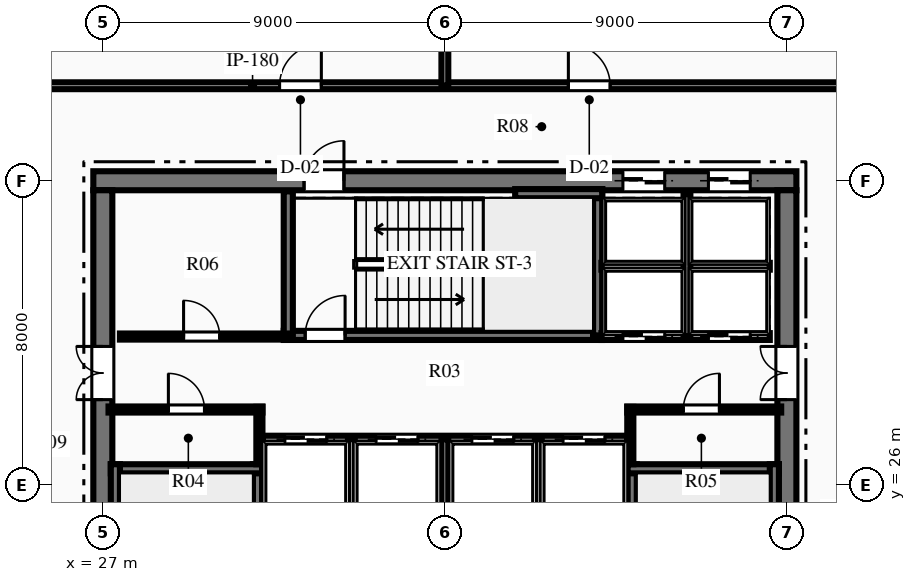
"""IFC4 building model, lengths in metres.
Left out: names, types, materials, properties, quantities, classifications, styles, units other than length and angle.
Written with IfcOpenShell. Run it as: python <this file> out.ifc"""

import sys

from ifc_helpers import new_model, si_unit, direction, frame, frame_2d, origin, place, context, subcontext, project, spatial, rectangle, extrude, element, fill, save


model = new_model("IFC4")
c1 = context("Model", 3, precision=1e-05, world=origin(), true_north=direction((0.0, 1.0)))
c2 = subcontext(c1, "Body", "Model", "MODEL_VIEW")
j1 = project(units=[si_unit("LENGTHUNIT", "METRE"), si_unit("PLANEANGLEUNIT", "RADIAN")], contexts=[c1])
p1 = place(None, origin())
s1 = spatial("IfcSite", under=j1, at=p1, CompositionType="ELEMENT")
p2 = place(p1, origin())
s2 = spatial("IfcBuilding", under=s1, at=p2, CompositionType="ELEMENT")
p3 = place(p2, frame((0.0, 0.0, 189.45)))
s3 = spatial("IfcBuildingStorey", under=s2, at=p3, CompositionType="ELEMENT", Elevation=189.45)
p4 = place(p3, frame((26.75, 34.0, 0.0), z_axis=(0.0, 0.0, 1.0), x_axis=(1.0, 0.0, 0.0)))
e1 = element("IfcWall", 1, at=p4, inside=s3, PredefinedType="SHEAR", context=c2, shape_type="SweptSolid", body=[
    extrude(rectangle(XDim=18.5, YDim=0.5, at=frame_2d((9.25, 0.0))), origin(), (0.0, 0.0, 1.0), 4.5),
])
p5 = place(p4, frame((5.545, 0.0, 0.0)))
e2 = element("IfcOpeningElement", 2, at=p5, cuts=e1, PredefinedType="OPENING", context=c2, shape_type="SweptSolid", body=[
    extrude(rectangle(XDim=1.05, YDim=2.15, at=frame_2d((0.525, 1.075))), frame((0.0, 0.26, 0.0), z_axis=(0.0, -1.0, 0.0), x_axis=(1.0, 0.0, 0.0)), (0.0, 0.0, 1.0), 0.52),
])
p6 = place(p4, frame((13.935, 0.0, 0.0)))
e3 = element("IfcOpeningElement", 3, at=p6, cuts=e1, PredefinedType="OPENING", context=c2, shape_type="SweptSolid", body=[
    extrude(rectangle(XDim=1.1, YDim=2.15, at=frame_2d((0.55, 1.075))), frame((0.0, 0.26, 0.0), z_axis=(0.0, -1.0, 0.0), x_axis=(1.0, 0.0, 0.0)), (0.0, 0.0, 1.0), 0.52),
])
p7 = place(p4, frame((16.185, 0.0, 0.0)))
e4 = element("IfcOpeningElement", 4, at=p7, cuts=e1, PredefinedType="OPENING", context=c2, shape_type="SweptSolid", body=[
    extrude(rectangle(XDim=1.1, YDim=2.15, at=frame_2d((0.55, 1.075))), frame((0.0, 0.26, 0.0), z_axis=(0.0, -1.0, 0.0), x_axis=(1.0, 0.0, 0.0)), (0.0, 0.0, 1.0), 0.52),
])
p8 = place(p3, frame((27.0, 18.25, 0.0), z_axis=(0.0, 0.0, 1.0), x_axis=(0.0, 1.0, 0.0)))
e5 = element("IfcWall", 5, at=p8, inside=s3, PredefinedType="SHEAR", context=c2, shape_type="SweptSolid", body=[
    extrude(rectangle(XDim=15.5, YDim=0.5, at=frame_2d((7.75, 0.0))), origin(), (0.0, 0.0, 1.0), 4.5),
])
p9 = place(p8, frame((9.99, 0.0, 0.0)))
e6 = element("IfcOpeningElement", 6, at=p9, cuts=e5, PredefinedType="OPENING", context=c2, shape_type="SweptSolid", body=[
    extrude(rectangle(XDim=1.4, YDim=2.2, at=frame_2d((0.7, 1.1))), frame((0.0, 0.26, 0.0), z_axis=(0.0, -1.0, 0.0), x_axis=(1.0, 0.0, 0.0)), (0.0, 0.0, 1.0), 0.52),
])
p10 = place(p3, frame((45.0, 18.25, 0.0), z_axis=(0.0, 0.0, 1.0), x_axis=(0.0, 1.0, 0.0)))
e7 = element("IfcWall", 7, at=p10, inside=s3, PredefinedType="SHEAR", context=c2, shape_type="SweptSolid", body=[
    extrude(rectangle(XDim=15.5, YDim=0.5, at=frame_2d((7.75, 0.0))), origin(), (0.0, 0.0, 1.0), 4.5),
])
p11 = place(p10, frame((9.99, 0.0, 0.0)))
e8 = element("IfcOpeningElement", 8, at=p11, cuts=e7, PredefinedType="OPENING", context=c2, shape_type="SweptSolid", body=[
    extrude(rectangle(XDim=1.4, YDim=2.2, at=frame_2d((0.7, 1.1))), frame((0.0, 0.26, 0.0), z_axis=(0.0, -1.0, 0.0), x_axis=(1.0, 0.0, 0.0)), (0.0, 0.0, 1.0), 0.52),
])
p12 = place(p3, frame((31.07, 18.28, 0.0), z_axis=(0.0, 0.0, 1.0), x_axis=(0.0, 1.0, 0.0)))
e9 = element("IfcWall", 9, at=p12, inside=s3, PredefinedType="SHEAR", context=c2, shape_type="SweptSolid", body=[
    extrude(rectangle(XDim=8.26, YDim=0.24, at=frame_2d((4.13, 0.0))), origin(), (0.0, 0.0, 1.0), 4.5),
])
p13 = place(p12, frame((0.365, 0.0, 0.0)))
e10 = element("IfcOpeningElement", 10, at=p13, cuts=e9, PredefinedType="OPENING", context=c2, shape_type="SweptSolid", body=[
    extrude(rectangle(XDim=1.05, YDim=2.15, at=frame_2d((0.525, 1.075))), frame((0.0, 0.13, 0.0), z_axis=(0.0, -1.0, 0.0), x_axis=(1.0, 0.0, 0.0)), (0.0, 0.0, 1.0), 0.26),
])
p14 = place(p3, frame((27.21, 26.42, 0.0), z_axis=(0.0, 0.0, 1.0), x_axis=(1.0, 0.0, 0.0)))
e11 = element("IfcWall", 11, at=p14, inside=s3, PredefinedType="SHEAR", context=c2, shape_type="SweptSolid", body=[
    extrude(rectangle(XDim=3.98, YDim=0.24, at=frame_2d((1.99, 0.0))), origin(), (0.0, 0.0, 1.0), 4.5),
])
p15 = place(p3, frame((27.33, 18.28, 0.0), z_axis=(0.0, 0.0, 1.0), x_axis=(0.0, 1.0, 0.0)))
e12 = element("IfcWall", 12, at=p15, inside=s3, PredefinedType="SHEAR", context=c2, shape_type="SweptSolid", body=[
    extrude(rectangle(XDim=8.26, YDim=0.24, at=frame_2d((4.13, 0.0))), origin(), (0.0, 0.0, 1.0), 4.5),
])
p16 = place(p3, frame((40.93, 18.28, 0.0), z_axis=(0.0, 0.0, 1.0), x_axis=(0.0, 1.0, 0.0)))
e13 = element("IfcWall", 13, at=p16, inside=s3, PredefinedType="SHEAR", context=c2, shape_type="SweptSolid", body=[
    extrude(rectangle(XDim=8.26, YDim=0.24, at=frame_2d((4.13, 0.0))), origin(), (0.0, 0.0, 1.0), 4.5),
])
p17 = place(p16, frame((0.365, 0.0, 0.0)))
e14 = element("IfcOpeningElement", 14, at=p17, cuts=e13, PredefinedType="OPENING", context=c2, shape_type="SweptSolid", body=[
    extrude(rectangle(XDim=1.05, YDim=2.15, at=frame_2d((0.525, 1.075))), frame((0.0, 0.13, 0.0), z_axis=(0.0, -1.0, 0.0), x_axis=(1.0, 0.0, 0.0)), (0.0, 0.0, 1.0), 0.26),
])
p18 = place(p3, frame((40.81, 26.42, 0.0), z_axis=(0.0, 0.0, 1.0), x_axis=(1.0, 0.0, 0.0)))
e15 = element("IfcWall", 15, at=p18, inside=s3, PredefinedType="SHEAR", context=c2, shape_type="SweptSolid", body=[
    extrude(rectangle(XDim=3.98, YDim=0.24, at=frame_2d((1.99, 0.0))), origin(), (0.0, 0.0, 1.0), 4.5),
])
p19 = place(p3, frame((44.67, 18.28, 0.0), z_axis=(0.0, 0.0, 1.0), x_axis=(0.0, 1.0, 0.0)))
e16 = element("IfcWall", 16, at=p19, inside=s3, PredefinedType="SHEAR", context=c2, shape_type="SweptSolid", body=[
    extrude(rectangle(XDim=8.26, YDim=0.24, at=frame_2d((4.13, 0.0))), origin(), (0.0, 0.0, 1.0), 4.5),
])
p20 = place(p3, frame((31.76, 29.93, 0.0), z_axis=(0.0, 0.0, 1.0), x_axis=(1.0, 0.0, 0.0)))
e17 = element("IfcWall", 17, at=p20, inside=s3, PredefinedType="SHEAR", context=c2, shape_type="SweptSolid", body=[
    extrude(rectangle(XDim=8.38, YDim=0.24, at=frame_2d((4.19, 0.0))), origin(), (0.0, 0.0, 1.0), 4.5),
])
p21 = place(p20, frame((0.565, 0.0, 0.0)))
e18 = element("IfcOpeningElement", 18, at=p21, cuts=e17, PredefinedType="OPENING", context=c2, shape_type="SweptSolid", body=[
    extrude(rectangle(XDim=1.05, YDim=2.15, at=frame_2d((0.525, 1.075))), frame((0.0, 0.13, 0.0), z_axis=(0.0, -1.0, 0.0), x_axis=(1.0, 0.0, 0.0)), (0.0, 0.0, 1.0), 0.26),
])
p22 = place(p3, frame((31.88, 29.93, 0.0), z_axis=(0.0, 0.0, 1.0), x_axis=(0.0, 1.0, 0.0)))
e19 = element("IfcWall", 19, at=p22, inside=s3, PredefinedType="SHEAR", context=c2, shape_type="SweptSolid", body=[
    extrude(rectangle(XDim=3.79, YDim=0.24, at=frame_2d((1.895, 0.0))), origin(), (0.0, 0.0, 1.0), 4.5),
])
p23 = place(p3, frame((40.02, 29.93, 0.0), z_axis=(0.0, 0.0, 1.0), x_axis=(0.0, 1.0, 0.0)))
e20 = element("IfcWall", 20, at=p23, inside=s3, PredefinedType="SHEAR", context=c2, shape_type="SweptSolid", body=[
    extrude(rectangle(XDim=3.85, YDim=0.24, at=frame_2d((1.925, 0.0))), origin(), (0.0, 0.0, 1.0), 4.5),
])
p24 = place(p3, frame((37.85, 33.66, 0.0), z_axis=(0.0, 0.0, 1.0), x_axis=(1.0, 0.0, 0.0)))
e21 = element("IfcWall", 21, at=p24, inside=s3, PredefinedType="SHEAR", context=c2, shape_type="SweptSolid", body=[
    extrude(rectangle(XDim=2.29, YDim=0.24, at=frame_2d((1.145, 0.0))), origin(), (0.0, 0.0, 1.0), 4.5),
])
p25 = place(p3, frame((27.15, 27.98, 0.0), z_axis=(0.0, 0.0, 1.0), x_axis=(1.0, 0.0, 0.0)))
e22 = element("IfcWall", 22, at=p25, inside=s3, PredefinedType="PARTITIONING", context=c2, shape_type="SweptSolid", body=[
    extrude(rectangle(XDim=4.05, YDim=0.16, at=frame_2d((2.025, 0.0))), origin(), (0.0, 0.0, 1.0), 4.09),
])
p26 = place(p25, frame((1.575, 0.0, 0.0)))
e23 = element("IfcOpeningElement", 23, at=p26, cuts=e22, PredefinedType="OPENING", context=c2, shape_type="SweptSolid", body=[
    extrude(rectangle(XDim=0.95, YDim=2.15, at=frame_2d((0.475, 1.075))), frame((0.0, 0.09, 0.0), z_axis=(0.0, -1.0, 0.0), x_axis=(1.0, 0.0, 0.0)), (0.0, 0.0, 1.0), 0.18),
])
p27 = place(p3, frame((31.12, 26.54, 0.0), z_axis=(0.0, 0.0, 1.0), x_axis=(0.0, 1.0, 0.0)))
e24 = element("IfcWall", 24, at=p27, inside=s3, PredefinedType="PARTITIONING", context=c2, shape_type="SweptSolid", body=[
    extrude(rectangle(XDim=1.51, YDim=0.16, at=frame_2d((0.755, 0.0))), origin(), (0.0, 0.0, 1.0), 4.09),
])
p28 = place(p3, frame((40.8, 27.98, 0.0), z_axis=(0.0, 0.0, 1.0), x_axis=(1.0, 0.0, 0.0)))
e25 = element("IfcWall", 25, at=p28, inside=s3, PredefinedType="PARTITIONING", context=c2, shape_type="SweptSolid", body=[
    extrude(rectangle(XDim=4.05, YDim=0.16, at=frame_2d((2.025, 0.0))), origin(), (0.0, 0.0, 1.0), 4.09),
])
p29 = place(p28, frame((1.475, 0.0, 0.0)))
e26 = element("IfcOpeningElement", 26, at=p29, cuts=e25, PredefinedType="OPENING", context=c2, shape_type="SweptSolid", body=[
    extrude(rectangle(XDim=0.95, YDim=2.15, at=frame_2d((0.475, 1.075))), frame((0.0, 0.09, 0.0), z_axis=(0.0, -1.0, 0.0), x_axis=(1.0, 0.0, 0.0)), (0.0, 0.0, 1.0), 0.18),
])
p30 = place(p3, frame((40.88, 26.54, 0.0), z_axis=(0.0, 0.0, 1.0), x_axis=(0.0, 1.0, 0.0)))
e27 = element("IfcWall", 27, at=p30, inside=s3, PredefinedType="PARTITIONING", context=c2, shape_type="SweptSolid", body=[
    extrude(rectangle(XDim=1.51, YDim=0.16, at=frame_2d((0.755, 0.0))), origin(), (0.0, 0.0, 1.0), 4.09),
])
p31 = place(p3, frame((27.45, 29.9, 0.0), z_axis=(0.0, 0.0, 1.0), x_axis=(1.0, 0.0, 0.0)))
e28 = element("IfcWall", 28, at=p31, inside=s3, PredefinedType="PARTITIONING", context=c2, shape_type="SweptSolid", body=[
    extrude(rectangle(XDim=4.43, YDim=0.16, at=frame_2d((2.215, 0.0))), origin(), (0.0, 0.0, 1.0), 4.09),
])
p32 = place(p31, frame((1.675, 0.0, 0.0)))
e29 = element("IfcOpeningElement", 29, at=p32, cuts=e28, PredefinedType="OPENING", context=c2, shape_type="SweptSolid", body=[
    extrude(rectangle(XDim=0.95, YDim=2.15, at=frame_2d((0.475, 1.075))), frame((0.0, 0.09, 0.0), z_axis=(0.0, -1.0, 0.0), x_axis=(1.0, 0.0, 0.0)), (0.0, 0.0, 1.0), 0.18),
])
p33 = place(p3, frame((40.12, 29.9, 0.0), z_axis=(0.0, 0.0, 1.0), x_axis=(1.0, 0.0, 0.0)))
e30 = element("IfcWall", 30, at=p33, inside=s3, PredefinedType="PARTITIONING", context=c2, shape_type="SweptSolid", body=[
    extrude(rectangle(XDim=4.43, YDim=0.18, at=frame_2d((2.215, 0.0))), origin(), (0.0, 0.0, 1.0), 4.09),
])
p34 = place(p33, frame((0.565, 0.0, 0.0)))
e31 = element("IfcOpeningElement", 31, at=p34, cuts=e30, PredefinedType="OPENING", context=c2, shape_type="SweptSolid", body=[
    extrude(rectangle(XDim=1.1, YDim=2.15, at=frame_2d((0.55, 1.075))), frame((0.0, 0.1, 0.0), z_axis=(0.0, -1.0, 0.0), x_axis=(1.0, 0.0, 0.0)), (0.0, 0.0, 1.0), 0.2),
])
p35 = place(p33, frame((2.815, 0.0, 0.0)))
e32 = element("IfcOpeningElement", 32, at=p35, cuts=e30, PredefinedType="OPENING", context=c2, shape_type="SweptSolid", body=[
    extrude(rectangle(XDim=1.1, YDim=2.15, at=frame_2d((0.55, 1.075))), frame((0.0, 0.1, 0.0), z_axis=(0.0, -1.0, 0.0), x_axis=(1.0, 0.0, 0.0)), (0.0, 0.0, 1.0), 0.2),
])
p36 = place(p3, frame((40.12, 31.75, 0.0), z_axis=(0.0, 0.0, 1.0), x_axis=(1.0, 0.0, 0.0)))
e33 = element("IfcWall", 33, at=p36, inside=s3, PredefinedType="PARTITIONING", context=c2, shape_type="SweptSolid", body=[
    extrude(rectangle(XDim=4.43, YDim=0.18, at=frame_2d((2.215, 0.0))), origin(), (0.0, 0.0, 1.0), 4.09),
])
p37 = place(p3, frame((42.37, 29.9, 0.0), z_axis=(0.0, 0.0, 1.0), x_axis=(0.0, 1.0, 0.0)))
e34 = element("IfcWall", 34, at=p37, inside=s3, PredefinedType="PARTITIONING", context=c2, shape_type="SweptSolid", body=[
    extrude(rectangle(XDim=3.75, YDim=0.18, at=frame_2d((1.875, 0.0))), origin(), (0.0, 0.0, 1.0), 4.09),
])
p38 = place(p3, frame((31.2, 27.2, 0.0), z_axis=(0.0, 0.0, 1.0), x_axis=(1.0, 0.0, 0.0)))
e35 = element("IfcWall", 35, at=p38, inside=s3, PredefinedType="PARTITIONING", context=c2, shape_type="SweptSolid", body=[
    extrude(rectangle(XDim=9.6, YDim=0.18, at=frame_2d((4.8, 0.0))), origin(), (0.0, 0.0, 1.0), 4.09),
])
p39 = place(p38, frame((0.59, 0.0, 0.0)))
e36 = element("IfcOpeningElement", 36, at=p39, cuts=e35, PredefinedType="OPENING", context=c2, shape_type="SweptSolid", body=[
    extrude(rectangle(XDim=1.1, YDim=2.15, at=frame_2d((0.55, 1.075))), frame((0.0, 0.1, 0.0), z_axis=(0.0, -1.0, 0.0), x_axis=(1.0, 0.0, 0.0)), (0.0, 0.0, 1.0), 0.2),
])
p40 = place(p38, frame((2.99, 0.0, 0.0)))
e37 = element("IfcOpeningElement", 37, at=p40, cuts=e35, PredefinedType="OPENING", context=c2, shape_type="SweptSolid", body=[
    extrude(rectangle(XDim=1.1, YDim=2.15, at=frame_2d((0.55, 1.075))), frame((0.0, 0.1, 0.0), z_axis=(0.0, -1.0, 0.0), x_axis=(1.0, 0.0, 0.0)), (0.0, 0.0, 1.0), 0.2),
])
p41 = place(p38, frame((5.51, 0.0, 0.0)))
e38 = element("IfcOpeningElement", 38, at=p41, cuts=e35, PredefinedType="OPENING", context=c2, shape_type="SweptSolid", body=[
    extrude(rectangle(XDim=1.1, YDim=2.15, at=frame_2d((0.55, 1.075))), frame((0.0, 0.1, 0.0), z_axis=(0.0, -1.0, 0.0), x_axis=(1.0, 0.0, 0.0)), (0.0, 0.0, 1.0), 0.2),
])
p42 = place(p38, frame((7.91, 0.0, 0.0)))
e39 = element("IfcOpeningElement", 39, at=p42, cuts=e35, PredefinedType="OPENING", context=c2, shape_type="SweptSolid", body=[
    extrude(rectangle(XDim=1.1, YDim=2.15, at=frame_2d((0.55, 1.075))), frame((0.0, 0.1, 0.0), z_axis=(0.0, -1.0, 0.0), x_axis=(1.0, 0.0, 0.0)), (0.0, 0.0, 1.0), 0.2),
])
for number, where, z_axis, x_axis in (
    (40, (33.54, 25.3, 0.0), (0.0, 0.0, 1.0), (0.0, 1.0, 0.0)),
    (41, (36.0, 25.3, 0.0), (0.0, 0.0, 1.0), (0.0, 1.0, 0.0)),
    (42, (38.46, 25.3, 0.0), (0.0, 0.0, 1.0), (0.0, 1.0, 0.0)),
):
    element("IfcWall", number, at=place(p3, frame(where, z_axis=z_axis, x_axis=x_axis)), inside=s3, PredefinedType="PARTITIONING", context=c2, shape_type="SweptSolid", body=[
        extrude(rectangle(XDim=1.9, YDim=0.18, at=frame_2d((0.95, 0.0))), origin(), (0.0, 0.0, 1.0), 4.09),
    ])
p43 = place(p3, frame((24.5, 36.5, 0.0), z_axis=(0.0, 0.0, 1.0), x_axis=(1.0, 0.0, 0.0)))
e43 = element("IfcWall", 43, at=p43, inside=s3, PredefinedType="PARTITIONING", context=c2, shape_type="SweptSolid", body=[
    extrude(rectangle(XDim=23.0, YDim=0.18, at=frame_2d((11.5, 0.0))), origin(), (0.0, 0.0, 1.0), 4.09),
])
p44 = place(p43, frame((7.15, 0.0, 0.0)))
e44 = element("IfcOpeningElement", 44, at=p44, cuts=e43, PredefinedType="OPENING", context=c2, shape_type="SweptSolid", body=[
    extrude(rectangle(XDim=1.1, YDim=2.15, at=frame_2d((0.55, 1.075))), frame((0.0, 0.1, 0.0), z_axis=(0.0, -1.0, 0.0), x_axis=(1.0, 0.0, 0.0)), (0.0, 0.0, 1.0), 0.2),
])
p45 = place(p43, frame((14.75, 0.0, 0.0)))
e45 = element("IfcOpeningElement", 45, at=p45, cuts=e43, PredefinedType="OPENING", context=c2, shape_type="SweptSolid", body=[
    extrude(rectangle(XDim=1.1, YDim=2.15, at=frame_2d((0.55, 1.075))), frame((0.0, 0.1, 0.0), z_axis=(0.0, -1.0, 0.0), x_axis=(1.0, 0.0, 0.0)), (0.0, 0.0, 1.0), 0.2),
])
p46 = place(p3, frame((36.0, 36.5, 0.0), z_axis=(0.0, 0.0, 1.0), x_axis=(0.0, 1.0, 0.0)))
e46 = element("IfcWall", 46, at=p46, inside=s3, PredefinedType="PARTITIONING", context=c2, shape_type="SweptSolid", body=[
    extrude(rectangle(XDim=18.678, YDim=0.18, at=frame_2d((9.339, 0.0))), origin(), (0.0, 0.0, 1.0), 2.885),
])
p47 = place(p26, origin())
e47 = element("IfcDoor", 47, at=p47, inside=s3, OperationType="SINGLE_SWING_LEFT", PredefinedType="DOOR", context=c2, shape_type="SweptSolid", body=[
    extrude(rectangle(XDim=0.95, YDim=2.15, at=frame_2d((0.475, 1.075))), frame((0.0, 0.025, 0.0), z_axis=(0.0, -1.0, 0.0), x_axis=(1.0, 0.0, 0.0)), (0.0, 0.0, 1.0), 0.05),
])
fill(e23, e47)
p48 = place(p29, origin())
e48 = element("IfcDoor", 48, at=p48, inside=s3, OperationType="SINGLE_SWING_RIGHT", PredefinedType="DOOR", context=c2, shape_type="SweptSolid", body=[
    extrude(rectangle(XDim=0.95, YDim=2.15, at=frame_2d((0.475, 1.075))), frame((0.0, 0.025, 0.0), z_axis=(0.0, -1.0, 0.0), x_axis=(1.0, 0.0, 0.0)), (0.0, 0.0, 1.0), 0.05),
])
fill(e26, e48)
p49 = place(p32, origin())
e49 = element("IfcDoor", 49, at=p49, inside=s3, OperationType="SINGLE_SWING_LEFT", PredefinedType="DOOR", context=c2, shape_type="SweptSolid", body=[
    extrude(rectangle(XDim=0.95, YDim=2.15, at=frame_2d((0.475, 1.075))), frame((0.0, 0.025, 0.0), z_axis=(0.0, -1.0, 0.0), x_axis=(1.0, 0.0, 0.0)), (0.0, 0.0, 1.0), 0.05),
])
fill(e29, e49)
p50 = place(p21, origin())
e50 = element("IfcDoor", 50, at=p50, inside=s3, OperationType="SINGLE_SWING_RIGHT", PredefinedType="DOOR", context=c2, shape_type="SweptSolid", body=[
    extrude(rectangle(XDim=1.05, YDim=2.15, at=frame_2d((0.525, 1.075))), frame((0.0, 0.025, 0.0), z_axis=(0.0, -1.0, 0.0), x_axis=(1.0, 0.0, 0.0)), (0.0, 0.0, 1.0), 0.05),
])
fill(e18, e50)
p51 = place(p9, origin())
e51 = element("IfcDoor", 51, at=p51, inside=s3, OperationType="DOUBLE_DOOR_SINGLE_SWING", PredefinedType="DOOR", context=c2, shape_type="SweptSolid", body=[
    extrude(rectangle(XDim=1.4, YDim=2.2, at=frame_2d((0.7, 1.1))), frame((0.0, 0.025, 0.0), z_axis=(0.0, -1.0, 0.0), x_axis=(1.0, 0.0, 0.0)), (0.0, 0.0, 1.0), 0.05),
])
fill(e6, e51)
p52 = place(p11, origin())
e52 = element("IfcDoor", 52, at=p52, inside=s3, OperationType="DOUBLE_DOOR_SINGLE_SWING", PredefinedType="DOOR", context=c2, shape_type="SweptSolid", body=[
    extrude(rectangle(XDim=1.4, YDim=2.2, at=frame_2d((0.7, 1.1))), frame((0.0, 0.025, 0.0), z_axis=(0.0, -1.0, 0.0), x_axis=(1.0, 0.0, 0.0)), (0.0, 0.0, 1.0), 0.05),
])
fill(e8, e52)
p53 = place(p44, origin())
e53 = element("IfcDoor", 53, at=p53, inside=s3, OperationType="SINGLE_SWING_RIGHT", PredefinedType="DOOR", context=c2, shape_type="SweptSolid", body=[
    extrude(rectangle(XDim=1.1, YDim=2.15, at=frame_2d((0.55, 1.075))), frame((0.0, 0.025, 0.0), z_axis=(0.0, -1.0, 0.0), x_axis=(1.0, 0.0, 0.0)), (0.0, 0.0, 1.0), 0.05),
])
fill(e44, e53)
p54 = place(p45, origin())
e54 = element("IfcDoor", 54, at=p54, inside=s3, OperationType="SINGLE_SWING_LEFT", PredefinedType="DOOR", context=c2, shape_type="SweptSolid", body=[
    extrude(rectangle(XDim=1.1, YDim=2.15, at=frame_2d((0.55, 1.075))), frame((0.0, 0.025, 0.0), z_axis=(0.0, -1.0, 0.0), x_axis=(1.0, 0.0, 0.0)), (0.0, 0.0, 1.0), 0.05),
])
fill(e45, e54)
p55 = place(p5, origin())
e55 = element("IfcDoor", 55, at=p55, inside=s3, OperationType="SINGLE_SWING_RIGHT", PredefinedType="DOOR", context=c2, shape_type="SweptSolid", body=[
    extrude(rectangle(XDim=1.05, YDim=2.15, at=frame_2d((0.525, 1.075))), frame((0.0, 0.025, 0.0), z_axis=(0.0, -1.0, 0.0), x_axis=(1.0, 0.0, 0.0)), (0.0, 0.0, 1.0), 0.05),
])
fill(e2, e55)
p56 = place(p34, origin())
e56 = element("IfcDoor", 56, at=p56, inside=s3, OperationType="SLIDING_TO_LEFT", PredefinedType="DOOR", context=c2, shape_type="SweptSolid", body=[
    extrude(rectangle(XDim=1.1, YDim=2.15, at=frame_2d((0.55, 1.075))), frame((0.0, 0.025, 0.0), z_axis=(0.0, -1.0, 0.0), x_axis=(1.0, 0.0, 0.0)), (0.0, 0.0, 1.0), 0.05),
])
fill(e31, e56)
p57 = place(p35, origin())
e57 = element("IfcDoor", 57, at=p57, inside=s3, OperationType="SLIDING_TO_LEFT", PredefinedType="DOOR", context=c2, shape_type="SweptSolid", body=[
    extrude(rectangle(XDim=1.1, YDim=2.15, at=frame_2d((0.55, 1.075))), frame((0.0, 0.025, 0.0), z_axis=(0.0, -1.0, 0.0), x_axis=(1.0, 0.0, 0.0)), (0.0, 0.0, 1.0), 0.05),
])
fill(e32, e57)
p58 = place(p6, origin())
e58 = element("IfcDoor", 58, at=p58, inside=s3, OperationType="SLIDING_TO_LEFT", PredefinedType="DOOR", context=c2, shape_type="SweptSolid", body=[
    extrude(rectangle(XDim=1.1, YDim=2.15, at=frame_2d((0.55, 1.075))), frame((0.0, 0.025, 0.0), z_axis=(0.0, -1.0, 0.0), x_axis=(1.0, 0.0, 0.0)), (0.0, 0.0, 1.0), 0.05),
])
fill(e3, e58)
p59 = place(p7, origin())
e59 = element("IfcDoor", 59, at=p59, inside=s3, OperationType="SLIDING_TO_LEFT", PredefinedType="DOOR", context=c2, shape_type="SweptSolid", body=[
    extrude(rectangle(XDim=1.1, YDim=2.15, at=frame_2d((0.55, 1.075))), frame((0.0, 0.025, 0.0), z_axis=(0.0, -1.0, 0.0), x_axis=(1.0, 0.0, 0.0)), (0.0, 0.0, 1.0), 0.05),
])
fill(e4, e59)
p60 = place(p39, origin())
e60 = element("IfcDoor", 60, at=p60, inside=s3, OperationType="SLIDING_TO_LEFT", PredefinedType="DOOR", context=c2, shape_type="SweptSolid", body=[
    extrude(rectangle(XDim=1.1, YDim=2.15, at=frame_2d((0.55, 1.075))), frame((0.0, 0.025, 0.0), z_axis=(0.0, -1.0, 0.0), x_axis=(1.0, 0.0, 0.0)), (0.0, 0.0, 1.0), 0.05),
])
fill(e36, e60)
p61 = place(p40, origin())
e61 = element("IfcDoor", 61, at=p61, inside=s3, OperationType="SLIDING_TO_LEFT", PredefinedType="DOOR", context=c2, shape_type="SweptSolid", body=[
    extrude(rectangle(XDim=1.1, YDim=2.15, at=frame_2d((0.55, 1.075))), frame((0.0, 0.025, 0.0), z_axis=(0.0, -1.0, 0.0), x_axis=(1.0, 0.0, 0.0)), (0.0, 0.0, 1.0), 0.05),
])
fill(e37, e61)
p62 = place(p41, origin())
e62 = element("IfcDoor", 62, at=p62, inside=s3, OperationType="SLIDING_TO_LEFT", PredefinedType="DOOR", context=c2, shape_type="SweptSolid", body=[
    extrude(rectangle(XDim=1.1, YDim=2.15, at=frame_2d((0.55, 1.075))), frame((0.0, 0.025, 0.0), z_axis=(0.0, -1.0, 0.0), x_axis=(1.0, 0.0, 0.0)), (0.0, 0.0, 1.0), 0.05),
])
fill(e38, e62)
p63 = place(p42, origin())
e63 = element("IfcDoor", 63, at=p63, inside=s3, OperationType="SLIDING_TO_LEFT", PredefinedType="DOOR", context=c2, shape_type="SweptSolid", body=[
    extrude(rectangle(XDim=1.1, YDim=2.15, at=frame_2d((0.55, 1.075))), frame((0.0, 0.025, 0.0), z_axis=(0.0, -1.0, 0.0), x_axis=(1.0, 0.0, 0.0)), (0.0, 0.0, 1.0), 0.05),
])
fill(e39, e63)
save(model, sys.argv[1])
